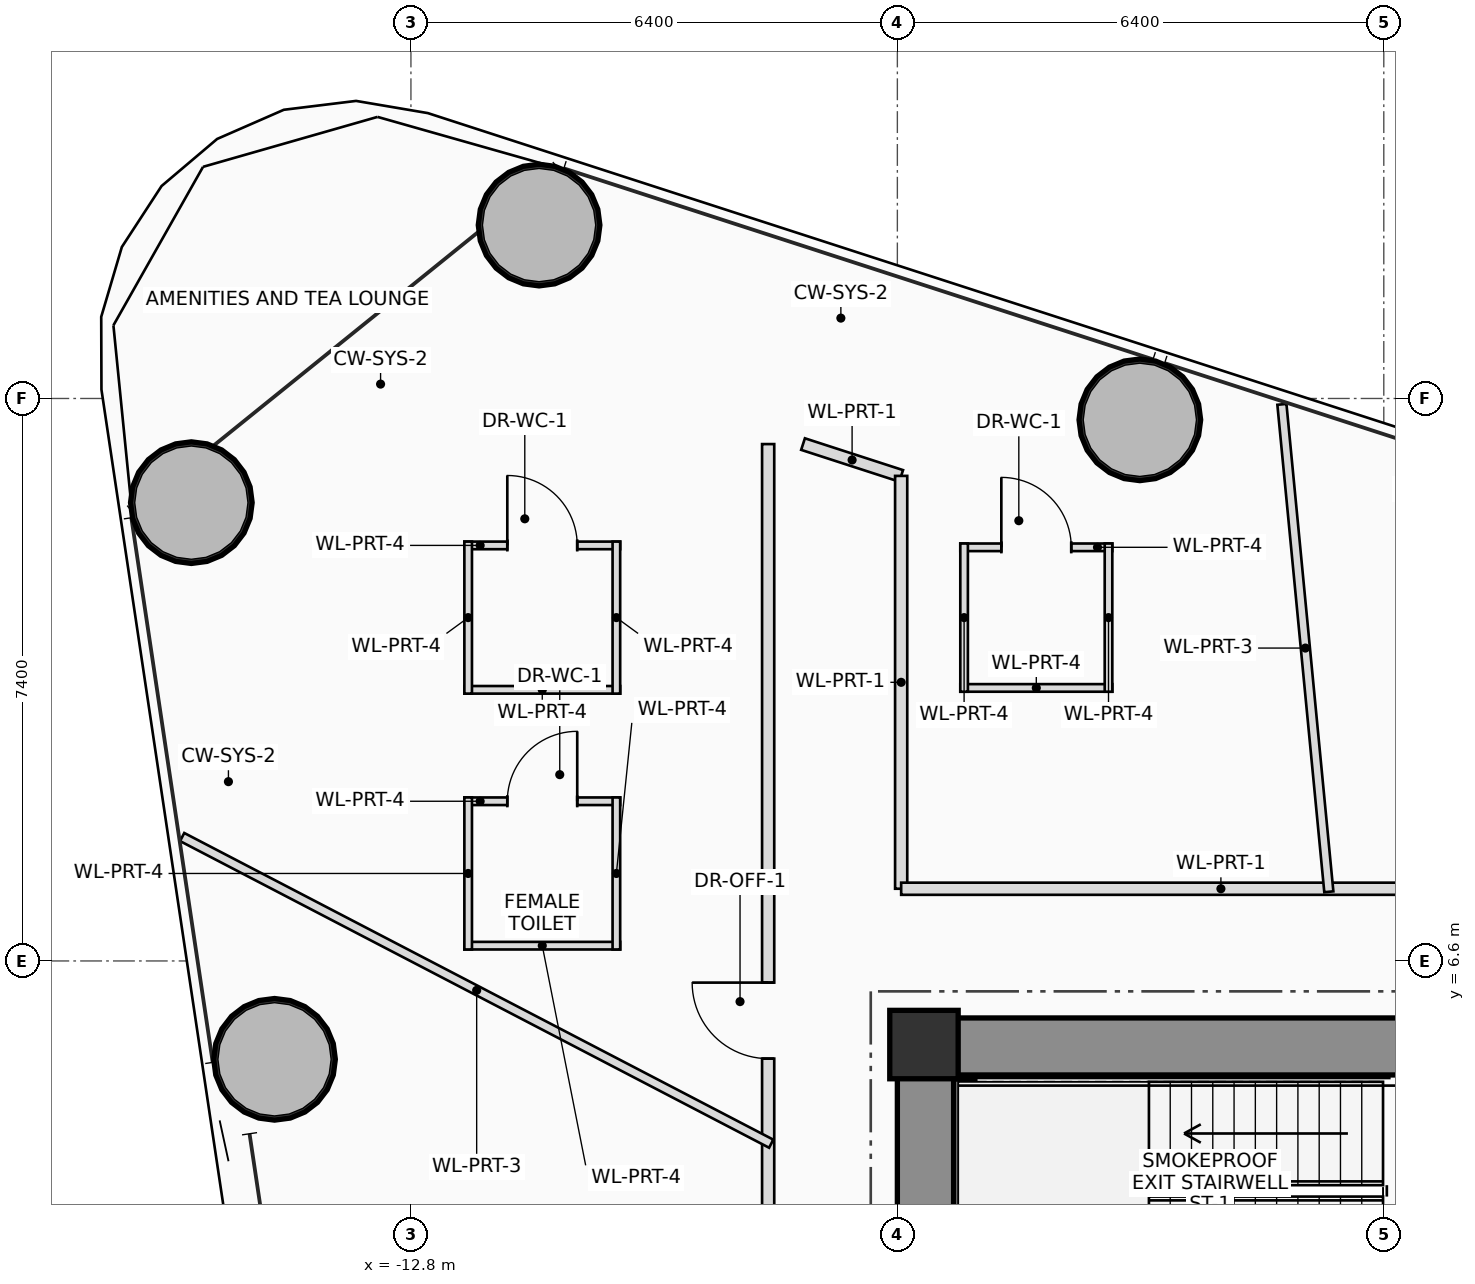
"""IFC4 building model, lengths in metres.
Left out: names, types, materials, properties, quantities, classifications, styles, units other than length and angle.
Written with IfcOpenShell. Run it as: python <this file> out.ifc"""

import sys

from ifc_helpers import new_model, si_unit, direction, frame, frame_2d, origin, origin_2d, place, context, subcontext, project, spatial, rectangle, hollow_circle, extrude, source, transform, mapped, element, fill, save


model = new_model("IFC4")
c1 = context("Model", 3, precision=1e-05, world=origin(), true_north=direction((0.0, 1.0)))
c2 = subcontext(c1, "Body", "Model", "MODEL_VIEW")
j1 = project(units=[si_unit("LENGTHUNIT", "METRE"), si_unit("PLANEANGLEUNIT", "RADIAN")], contexts=[c1])
p1 = place(None, origin())
s1 = spatial("IfcSite", under=j1, at=p1, CompositionType="ELEMENT")
p2 = place(p1, origin())
s2 = spatial("IfcBuilding", under=s1, at=p2, CompositionType="ELEMENT")
p3 = place(p2, frame((0.0, 0.0, 73.55)))
s3 = spatial("IfcBuildingStorey", under=s2, at=p3, CompositionType="ELEMENT", Elevation=73.55)
m1 = source(origin(), c2, "Body", "SweptSolid", [
    extrude(rectangle(XDim=0.9, YDim=0.9, at=origin_2d()), origin(), (0.0, 0.0, 1.0), 3.75),
])
p4 = place(p3, frame((-6.05, 5.5, 0.0), z_axis=(0.0, 0.0, 1.0), x_axis=(1.0, 0.0, 0.0)))
e1 = element("IfcColumn", 1, at=p4, inside=s3, PredefinedType="COLUMN", context=c2, shape_type="MappedRepresentation", body=[
    mapped(m1, transform((0.0, 0.0, 0.0), scale=1.0)),
])
p5 = place(p3, frame((-6.4, 5.475, 0.0), z_axis=(0.0, 0.0, 1.0), x_axis=(1.0, 0.0, 0.0)))
e2 = element("IfcWall", 2, at=p5, inside=s3, PredefinedType="SHEAR", context=c2, shape_type="SweptSolid", body=[
    extrude(rectangle(XDim=12.8, YDim=0.75, at=frame_2d((6.4, 0.0))), origin(), (0.0, 0.0, 1.0), 3.75),
])
p6 = place(p5, frame((8.6, 0.0, 0.0)))
e3 = element("IfcOpeningElement", 3, at=p6, cuts=e2, PredefinedType="OPENING", context=c2, shape_type="SweptSolid", body=[
    extrude(rectangle(XDim=1.2, YDim=2.2, at=frame_2d((0.6, 1.1))), frame((0.0, 0.385, 0.0), z_axis=(0.0, -1.0, 0.0), x_axis=(1.0, 0.0, 0.0)), (0.0, 0.0, 1.0), 0.77),
])
p7 = place(p3, frame((-6.025, 1.75, 0.0), z_axis=(0.0, 0.0, 1.0), x_axis=(0.0, 1.0, 0.0)))
e4 = element("IfcWall", 4, at=p7, inside=s3, PredefinedType="SHEAR", context=c2, shape_type="SweptSolid", body=[
    extrude(rectangle(XDim=3.35, YDim=0.75, at=frame_2d((1.675, 0.0))), origin(), (0.0, 0.0, 1.0), 3.75),
])
p8 = place(p3, frame((-5.52, 2.3, 0.0), z_axis=(0.0, 0.0, 1.0), x_axis=(0.0, 1.0, 0.0)))
e5 = element("IfcWall", 5, at=p8, inside=s3, PredefinedType="SHEAR", context=c2, shape_type="SweptSolid", body=[
    extrude(rectangle(XDim=2.75, YDim=0.28, at=frame_2d((1.375, 0.0))), origin(), (0.0, 0.0, 1.0), 3.75),
])
m2 = source(origin(), c2, "Body", "SweptSolid", [
    extrude(hollow_circle(Radius=0.8, WallThickness=0.055, at=origin_2d()), origin(), (0.0, 0.0, 1.0), 3.75),
])
for number, where, z_axis, x_axis in (
    (6, (-3.21, 13.719, 0.0), (0.0, 0.0, 1.0), (1.0, 0.0, 0.0)),
    (7, (-11.114, 16.281, 0.0), (0.0, 0.0, 1.0), (1.0, 0.0, 0.0)),
    (8, (-15.689, 12.629, 0.0), (0.0, 0.0, 1.0), (1.0, 0.0, 0.0)),
    (9, (-14.594, 5.306, 0.0), (0.0, 0.0, 1.0), (1.0, 0.0, 0.0)),
):
    element("IfcColumn", number, at=place(p3, frame(where, z_axis=z_axis, x_axis=x_axis)), inside=s3, PredefinedType="COLUMN", context=c2, shape_type="MappedRepresentation", body=[
        mapped(m2, transform((0.0, 0.0, 0.0), scale=1.0)),
    ])
p9 = place(p3, frame((-12.097, 12.067, 0.0), z_axis=(0.0, 0.0, 1.0), x_axis=(1.0, 0.0, 0.0)))
e10 = element("IfcWall", 10, at=p9, inside=s3, PredefinedType="PARTITIONING", context=c2, shape_type="SweptSolid", body=[
    extrude(rectangle(XDim=2.05, YDim=0.1, at=frame_2d((1.025, 0.0))), origin(), (0.0, 0.0, 1.0), 3.2),
])
p10 = place(p9, frame((0.565, 0.0, 0.0)))
e11 = element("IfcOpeningElement", 11, at=p10, cuts=e10, PredefinedType="OPENING", context=c2, shape_type="SweptSolid", body=[
    extrude(rectangle(XDim=0.92, YDim=2.1, at=frame_2d((0.46, 1.05))), frame((0.0, 0.06, 0.0), z_axis=(0.0, -1.0, 0.0), x_axis=(1.0, 0.0, 0.0)), (0.0, 0.0, 1.0), 0.12),
])
p11 = place(p3, frame((-10.047, 10.167, 0.0), z_axis=(0.0, 0.0, 1.0), x_axis=(-1.0, 0.0, 0.0)))
e12 = element("IfcWall", 12, at=p11, inside=s3, PredefinedType="PARTITIONING", context=c2, shape_type="SweptSolid", body=[
    extrude(rectangle(XDim=2.05, YDim=0.1, at=frame_2d((1.025, 0.0))), origin(), (0.0, 0.0, 1.0), 3.545),
])
p12 = place(p3, frame((-10.097, 12.117, 0.0), z_axis=(0.0, 0.0, 1.0), x_axis=(0.0, -1.0, 0.0)))
e13 = element("IfcWall", 13, at=p12, inside=s3, PredefinedType="PARTITIONING", context=c2, shape_type="SweptSolid", body=[
    extrude(rectangle(XDim=2.0, YDim=0.1, at=frame_2d((1.0, 0.0))), origin(), (0.0, 0.0, 1.0), 3.545),
])
p13 = place(p3, frame((-12.047, 10.117, 0.0), z_axis=(0.0, 0.0, 1.0), x_axis=(0.0, 1.0, 0.0)))
e14 = element("IfcWall", 14, at=p13, inside=s3, PredefinedType="PARTITIONING", context=c2, shape_type="SweptSolid", body=[
    extrude(rectangle(XDim=2.0, YDim=0.1, at=frame_2d((1.0, 0.0))), origin(), (0.0, 0.0, 1.0), 3.2),
])
p14 = place(p3, frame((-12.097, 8.701, 0.0), z_axis=(0.0, 0.0, 1.0), x_axis=(1.0, 0.0, 0.0)))
e15 = element("IfcWall", 15, at=p14, inside=s3, PredefinedType="PARTITIONING", context=c2, shape_type="SweptSolid", body=[
    extrude(rectangle(XDim=2.05, YDim=0.1, at=frame_2d((1.025, 0.0))), origin(), (0.0, 0.0, 1.0), 2.85),
])
p15 = place(p14, frame((0.565, 0.0, 0.0)))
e16 = element("IfcOpeningElement", 16, at=p15, cuts=e15, PredefinedType="OPENING", context=c2, shape_type="SweptSolid", body=[
    extrude(rectangle(XDim=0.92, YDim=2.1, at=frame_2d((0.46, 1.05))), frame((0.0, 0.06, 0.0), z_axis=(0.0, -1.0, 0.0), x_axis=(1.0, 0.0, 0.0)), (0.0, 0.0, 1.0), 0.12),
])
p16 = place(p3, frame((-10.047, 6.801, 0.0), z_axis=(0.0, 0.0, 1.0), x_axis=(-1.0, 0.0, 0.0)))
e17 = element("IfcWall", 17, at=p16, inside=s3, PredefinedType="PARTITIONING", context=c2, shape_type="SweptSolid", body=[
    extrude(rectangle(XDim=2.05, YDim=0.1, at=frame_2d((1.025, 0.0))), origin(), (0.0, 0.0, 1.0), 3.05),
])
p17 = place(p3, frame((-10.097, 8.751, 0.0), z_axis=(0.0, 0.0, 1.0), x_axis=(0.0, -1.0, 0.0)))
e18 = element("IfcWall", 18, at=p17, inside=s3, PredefinedType="PARTITIONING", context=c2, shape_type="SweptSolid", body=[
    extrude(rectangle(XDim=2.0, YDim=0.1, at=frame_2d((1.0, 0.0))), origin(), (0.0, 0.0, 1.0), 2.85),
])
p18 = place(p3, frame((-12.047, 6.751, 0.0), z_axis=(0.0, 0.0, 1.0), x_axis=(0.0, 1.0, 0.0)))
e19 = element("IfcWall", 19, at=p18, inside=s3, PredefinedType="PARTITIONING", context=c2, shape_type="SweptSolid", body=[
    extrude(rectangle(XDim=2.0, YDim=0.1, at=frame_2d((1.0, 0.0))), origin(), (0.0, 0.0, 1.0), 3.545),
])
p19 = place(p3, frame((-5.572, 12.042, 0.0), z_axis=(0.0, 0.0, 1.0), x_axis=(1.0, 0.0, 0.0)))
e20 = element("IfcWall", 20, at=p19, inside=s3, PredefinedType="PARTITIONING", context=c2, shape_type="SweptSolid", body=[
    extrude(rectangle(XDim=2.0, YDim=0.1, at=frame_2d((1.0, 0.0))), origin(), (0.0, 0.0, 1.0), 2.85),
])
p20 = place(p19, frame((0.54, 0.0, 0.0)))
e21 = element("IfcOpeningElement", 21, at=p20, cuts=e20, PredefinedType="OPENING", context=c2, shape_type="SweptSolid", body=[
    extrude(rectangle(XDim=0.92, YDim=2.1, at=frame_2d((0.46, 1.05))), frame((0.0, 0.06, 0.0), z_axis=(0.0, -1.0, 0.0), x_axis=(1.0, 0.0, 0.0)), (0.0, 0.0, 1.0), 0.12),
])
p21 = place(p3, frame((-3.572, 10.192, 0.0), z_axis=(0.0, 0.0, 1.0), x_axis=(-1.0, 0.0, 0.0)))
e22 = element("IfcWall", 22, at=p21, inside=s3, PredefinedType="PARTITIONING", context=c2, shape_type="SweptSolid", body=[
    extrude(rectangle(XDim=2.0, YDim=0.1, at=frame_2d((1.0, 0.0))), origin(), (0.0, 0.0, 1.0), 2.85),
])
p22 = place(p3, frame((-3.622, 12.092, 0.0), z_axis=(0.0, 0.0, 1.0), x_axis=(0.0, -1.0, 0.0)))
e23 = element("IfcWall", 23, at=p22, inside=s3, PredefinedType="PARTITIONING", context=c2, shape_type="SweptSolid", body=[
    extrude(rectangle(XDim=1.95, YDim=0.1, at=frame_2d((0.975, 0.0))), origin(), (0.0, 0.0, 1.0), 2.85),
])
p23 = place(p3, frame((-5.522, 10.142, 0.0), z_axis=(0.0, 0.0, 1.0), x_axis=(0.0, 1.0, 0.0)))
e24 = element("IfcWall", 24, at=p23, inside=s3, PredefinedType="PARTITIONING", context=c2, shape_type="SweptSolid", body=[
    extrude(rectangle(XDim=1.95, YDim=0.1, at=frame_2d((0.975, 0.0))), origin(), (0.0, 0.0, 1.0), 3.2),
])
p24 = place(p3, frame((-8.1, -7.55, 0.0), z_axis=(0.0, 0.0, 1.0), x_axis=(0.0, 1.0, 0.0)))
e25 = element("IfcWall", 25, at=p24, inside=s3, PredefinedType="PARTITIONING", context=c2, shape_type="SweptSolid", body=[
    extrude(rectangle(XDim=15.1, YDim=0.16, at=frame_2d((7.55, 0.0))), origin(), (0.0, 0.0, 1.0), 2.85),
])
p25 = place(p24, frame((8.855, 0.0, 0.0)))
e26 = element("IfcOpeningElement", 26, at=p25, cuts=e25, PredefinedType="OPENING", context=c2, shape_type="SweptSolid", body=[
    extrude(rectangle(XDim=1.0, YDim=2.25, at=frame_2d((0.5, 1.125))), frame((0.0, 0.09, 0.0), z_axis=(0.0, -1.0, 0.0), x_axis=(1.0, 0.0, 0.0)), (0.0, 0.0, 1.0), 0.18),
])
p26 = place(p24, frame((12.865, 0.0, 0.0)))
e27 = element("IfcOpeningElement", 27, at=p26, cuts=e25, PredefinedType="OPENING", context=c2, shape_type="SweptSolid", body=[
    extrude(rectangle(XDim=1.0, YDim=2.25, at=frame_2d((0.5, 1.125))), frame((0.0, 0.09, 0.0), z_axis=(0.0, -1.0, 0.0), x_axis=(1.0, 0.0, 0.0)), (0.0, 0.0, 1.0), 0.18),
])
p27 = place(p3, frame((-8.1, 7.55, 0.0), z_axis=(0.0, 0.0, 1.0), x_axis=(0.0, 1.0, 0.0)))
e28 = element("IfcWall", 28, at=p27, inside=s3, PredefinedType="PARTITIONING", context=c2, shape_type="SweptSolid", body=[
    extrude(rectangle(XDim=5.85, YDim=0.16, at=frame_2d((2.925, 0.0))), origin(), (0.0, 0.0, 1.0), 2.85),
])
p28 = place(p3, frame((-7.641, 13.4, 0.0), z_axis=(0.0, 0.0, 1.0), x_axis=(0.951277022007, -0.308337521884, 0.0)))
e29 = element("IfcWall", 29, at=p28, inside=s3, PredefinedType="PARTITIONING", context=c2, shape_type="SweptSolid", body=[
    extrude(rectangle(XDim=1.357, YDim=0.16, at=frame_2d((0.679, 0.0))), origin(), (0.0, 0.0, 1.0), 3.545),
])
p29 = place(p3, frame((-6.35, 12.981, 0.0), z_axis=(0.0, 0.0, 1.0), x_axis=(0.0, -1.0, 0.0)))
e30 = element("IfcWall", 30, at=p29, inside=s3, PredefinedType="PARTITIONING", context=c2, shape_type="SweptSolid", body=[
    extrude(rectangle(XDim=5.431, YDim=0.16, at=frame_2d((2.716, 0.0))), origin(), (0.0, 0.0, 1.0), 3.05),
])
p30 = place(p3, frame((-6.35, 7.55, 0.0), z_axis=(0.0, 0.0, 1.0), x_axis=(1.0, 0.0, 0.0)))
e31 = element("IfcWall", 31, at=p30, inside=s3, PredefinedType="PARTITIONING", context=c2, shape_type="SweptSolid", body=[
    extrude(rectangle(XDim=12.7, YDim=0.16, at=frame_2d((6.35, 0.0))), origin(), (0.0, 0.0, 1.0), 2.85),
])
p31 = place(p30, frame((8.564, 0.0, 0.0)))
e32 = element("IfcOpeningElement", 32, at=p31, cuts=e31, PredefinedType="OPENING", context=c2, shape_type="SweptSolid", body=[
    extrude(rectangle(XDim=1.0, YDim=2.25, at=frame_2d((0.5, 1.125))), frame((0.0, 0.09, 0.0), z_axis=(0.0, -1.0, 0.0), x_axis=(1.0, 0.0, 0.0)), (0.0, 0.0, 1.0), 0.18),
])
p32 = place(p3, frame((-0.723, 7.51, 0.0), z_axis=(0.0, 0.0, 1.0), x_axis=(-0.095840941038, 0.995396661648, 0.0)))
e33 = element("IfcWall", 33, at=p32, inside=s3, PredefinedType="PARTITIONING", context=c2, shape_type="SweptSolid", body=[
    extrude(rectangle(XDim=6.442, YDim=0.12, at=frame_2d((3.221, 0.0))), origin(), (0.0, 0.0, 1.0), 3.01),
])
p33 = place(p3, frame((-8.06, 4.196, 0.0), z_axis=(0.0, 0.0, 1.0), x_axis=(-0.887015422537, 0.461739797052, 0.0)))
e34 = element("IfcWall", 34, at=p33, inside=s3, PredefinedType="PARTITIONING", context=c2, shape_type="SweptSolid", body=[
    extrude(rectangle(XDim=8.738, YDim=0.12, at=frame_2d((4.369, 0.0))), origin(), (0.0, 0.0, 1.0), 2.85),
])
p34 = place(p10, origin())
e35 = element("IfcDoor", 35, at=p34, inside=s3, OperationType="SINGLE_SWING_LEFT", PredefinedType="DOOR", context=c2, shape_type="SweptSolid", body=[
    extrude(rectangle(XDim=0.92, YDim=2.1, at=frame_2d((0.46, 1.05))), frame((0.0, 0.025, 0.0), z_axis=(0.0, -1.0, 0.0), x_axis=(1.0, 0.0, 0.0)), (0.0, 0.0, 1.0), 0.05),
])
fill(e11, e35)
p35 = place(p15, origin())
e36 = element("IfcDoor", 36, at=p35, inside=s3, OperationType="SINGLE_SWING_RIGHT", PredefinedType="DOOR", context=c2, shape_type="SweptSolid", body=[
    extrude(rectangle(XDim=0.92, YDim=2.1, at=frame_2d((0.46, 1.05))), frame((0.0, 0.025, 0.0), z_axis=(0.0, -1.0, 0.0), x_axis=(1.0, 0.0, 0.0)), (0.0, 0.0, 1.0), 0.05),
])
fill(e16, e36)
p36 = place(p20, origin())
e37 = element("IfcDoor", 37, at=p36, inside=s3, OperationType="SINGLE_SWING_LEFT", PredefinedType="DOOR", context=c2, shape_type="SweptSolid", body=[
    extrude(rectangle(XDim=0.92, YDim=2.1, at=frame_2d((0.46, 1.05))), frame((0.0, 0.025, 0.0), z_axis=(0.0, -1.0, 0.0), x_axis=(1.0, 0.0, 0.0)), (0.0, 0.0, 1.0), 0.05),
])
fill(e21, e37)
p37 = place(p26, origin())
e38 = element("IfcDoor", 38, at=p37, inside=s3, OperationType="SINGLE_SWING_RIGHT", PredefinedType="DOOR", context=c2, shape_type="SweptSolid", body=[
    extrude(rectangle(XDim=1.0, YDim=2.25, at=frame_2d((0.5, 1.125))), frame((0.0, 0.025, 0.0), z_axis=(0.0, -1.0, 0.0), x_axis=(1.0, 0.0, 0.0)), (0.0, 0.0, 1.0), 0.05),
])
fill(e27, e38)
save(model, sys.argv[1])
